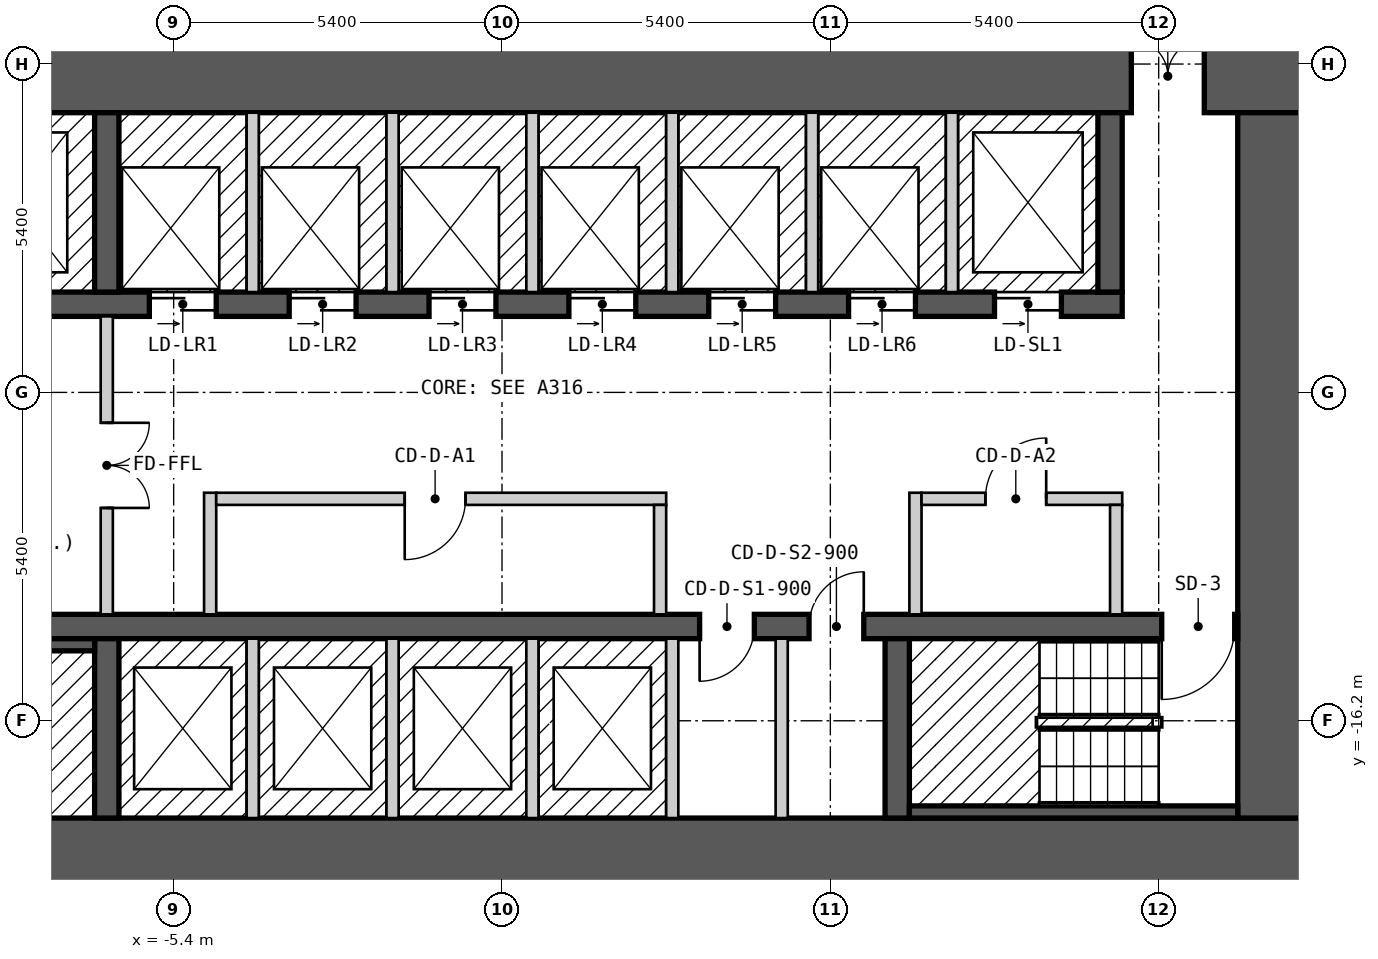
"""IFC4 building model, lengths in metres.
Left out: names, types, materials, properties, quantities, classifications, styles, units other than length and angle.
Written with IfcOpenShell. Run it as: python <this file> out.ifc"""

import sys

from ifc_helpers import new_model, si_unit, direction, frame, frame_2d, origin, place, context, subcontext, project, spatial, rectangle, extrude, element, fill, save


model = new_model("IFC4")
c1 = context("Model", 3, precision=1e-05, world=origin(), true_north=direction((0.0, 1.0)))
c2 = subcontext(c1, "Body", "Model", "MODEL_VIEW")
j1 = project(units=[si_unit("LENGTHUNIT", "METRE"), si_unit("PLANEANGLEUNIT", "RADIAN")], contexts=[c1])
p1 = place(None, origin())
s1 = spatial("IfcSite", under=j1, at=p1, CompositionType="ELEMENT")
p2 = place(p1, origin())
s2 = spatial("IfcBuilding", under=s1, at=p2, CompositionType="ELEMENT")
p3 = place(p2, frame((0.0, 0.0, 47.4)))
s3 = spatial("IfcBuildingStorey", under=s2, at=p3, CompositionType="ELEMENT", Elevation=47.4)
p4 = place(p3, frame((-13.3, -18.4, 0.0), z_axis=(0.0, 0.0, 1.0), x_axis=(1.0, 0.0, 0.0)))
e1 = element("IfcWall", 1, at=p4, inside=s3, PredefinedType="SHEAR", context=c2, shape_type="SweptSolid", body=[
    extrude(rectangle(XDim=26.6, YDim=1.2, at=frame_2d((13.3, 0.0))), origin(), (0.0, 0.0, 1.0), 2.7),
])
p5 = place(p3, frame((-13.3, -5.6, 0.0), z_axis=(0.0, 0.0, 1.0), x_axis=(1.0, 0.0, 0.0)))
e2 = element("IfcWall", 2, at=p5, inside=s3, PredefinedType="SHEAR", context=c2, shape_type="SweptSolid", body=[
    extrude(rectangle(XDim=26.6, YDim=1.2, at=frame_2d((13.3, 0.0))), origin(), (0.0, 0.0, 1.0), 2.7),
])
p6 = place(p5, frame((23.65, 0.0, 0.0)))
e3 = element("IfcOpeningElement", 3, at=p6, cuts=e2, PredefinedType="OPENING", context=c2, shape_type="SweptSolid", body=[
    extrude(rectangle(XDim=1.2, YDim=2.1, at=frame_2d((0.6, 1.05))), frame((0.0, 0.61, 0.0), z_axis=(0.0, -1.0, 0.0), x_axis=(1.0, 0.0, 0.0)), (0.0, 0.0, 1.0), 1.22),
])
p7 = place(p3, frame((12.7, -17.8, 0.0), z_axis=(0.0, 0.0, 1.0), x_axis=(0.0, 1.0, 0.0)))
e4 = element("IfcWall", 4, at=p7, inside=s3, PredefinedType="SHEAR", context=c2, shape_type="SweptSolid", body=[
    extrude(rectangle(XDim=11.6, YDim=1.2, at=frame_2d((5.8, 0.0))), origin(), (0.0, 0.0, 1.0), 2.7),
])
p8 = place(p3, frame((-12.1, -14.65, 0.0), z_axis=(0.0, 0.0, 1.0), x_axis=(1.0, 0.0, 0.0)))
e5 = element("IfcWall", 5, at=p8, inside=s3, PredefinedType="SHEAR", context=c2, shape_type="SweptSolid", body=[
    extrude(rectangle(XDim=24.2, YDim=0.4, at=frame_2d((12.1, 0.0))), origin(), (0.0, 0.0, 1.0), 2.7),
])
p9 = place(p8, frame((1.3, 0.0, 0.0), z_axis=(0.0, 0.0, 1.0), x_axis=(-1.0, 0.0, 0.0)))
e6 = element("IfcOpeningElement", 6, at=p9, cuts=e5, PredefinedType="OPENING", context=c2, shape_type="SweptSolid", body=[
    extrude(rectangle(XDim=1.2, YDim=2.1, at=frame_2d((0.6, 1.05))), frame((0.0, 0.21, 0.0), z_axis=(0.0, -1.0, 0.0), x_axis=(1.0, 0.0, 0.0)), (0.0, 0.0, 1.0), 0.42),
])
p10 = place(p8, frame((24.15, 0.0, 0.0), z_axis=(0.0, 0.0, 1.0), x_axis=(-1.0, 0.0, 0.0)))
e7 = element("IfcOpeningElement", 7, at=p10, cuts=e5, PredefinedType="OPENING", context=c2, shape_type="SweptSolid", body=[
    extrude(rectangle(XDim=1.2, YDim=2.1, at=frame_2d((0.6, 1.05))), frame((0.0, 0.21, 0.0), z_axis=(0.0, -1.0, 0.0), x_axis=(1.0, 0.0, 0.0)), (0.0, 0.0, 1.0), 0.42),
])
p11 = place(p8, frame((16.25, 0.0, 0.0), z_axis=(0.0, 0.0, 1.0), x_axis=(-1.0, 0.0, 0.0)))
e8 = element("IfcOpeningElement", 8, at=p11, cuts=e5, PredefinedType="OPENING", context=c2, shape_type="SweptSolid", body=[
    extrude(rectangle(XDim=0.9, YDim=2.1, at=frame_2d((0.45, 1.05))), frame((0.0, 0.21, 0.0), z_axis=(0.0, -1.0, 0.0), x_axis=(1.0, 0.0, 0.0)), (0.0, 0.0, 1.0), 0.42),
])
p12 = place(p8, frame((18.05, 0.0, 0.0), z_axis=(0.0, 0.0, 1.0), x_axis=(-1.0, 0.0, 0.0)))
e9 = element("IfcOpeningElement", 9, at=p12, cuts=e5, PredefinedType="OPENING", context=c2, shape_type="SweptSolid", body=[
    extrude(rectangle(XDim=0.9, YDim=2.1, at=frame_2d((0.45, 1.05))), frame((0.0, 0.21, 0.0), z_axis=(0.0, -1.0, 0.0), x_axis=(1.0, 0.0, 0.0)), (0.0, 0.0, 1.0), 0.42),
])
p13 = place(p3, frame((-12.1, -9.35, 0.0), z_axis=(0.0, 0.0, 1.0), x_axis=(1.0, 0.0, 0.0)))
e10 = element("IfcWall", 10, at=p13, inside=s3, PredefinedType="SHEAR", context=c2, shape_type="SweptSolid", body=[
    extrude(rectangle(XDim=22.3, YDim=0.4, at=frame_2d((11.15, 0.0))), origin(), (0.0, 0.0, 1.0), 2.7),
])
p14 = place(p13, frame((0.7, 0.0, 0.0)))
e11 = element("IfcOpeningElement", 11, at=p14, cuts=e10, PredefinedType="OPENING", context=c2, shape_type="SweptSolid", body=[
    extrude(rectangle(XDim=1.1, YDim=2.1, at=frame_2d((0.55, 1.05))), frame((0.0, 0.21, 0.0), z_axis=(0.0, -1.0, 0.0), x_axis=(1.0, 0.0, 0.0)), (0.0, 0.0, 1.0), 0.42),
])
p15 = place(p13, frame((3.5, 0.0, 0.0)))
e12 = element("IfcOpeningElement", 12, at=p15, cuts=e10, PredefinedType="OPENING", context=c2, shape_type="SweptSolid", body=[
    extrude(rectangle(XDim=1.1, YDim=2.1, at=frame_2d((0.55, 1.05))), frame((0.0, 0.21, 0.0), z_axis=(0.0, -1.0, 0.0), x_axis=(1.0, 0.0, 0.0)), (0.0, 0.0, 1.0), 0.42),
])
p16 = place(p13, frame((6.3, 0.0, 0.0)))
e13 = element("IfcOpeningElement", 13, at=p16, cuts=e10, PredefinedType="OPENING", context=c2, shape_type="SweptSolid", body=[
    extrude(rectangle(XDim=1.1, YDim=2.1, at=frame_2d((0.55, 1.05))), frame((0.0, 0.21, 0.0), z_axis=(0.0, -1.0, 0.0), x_axis=(1.0, 0.0, 0.0)), (0.0, 0.0, 1.0), 0.42),
])
p17 = place(p13, frame((8.6, 0.0, 0.0)))
e14 = element("IfcOpeningElement", 14, at=p17, cuts=e10, PredefinedType="OPENING", context=c2, shape_type="SweptSolid", body=[
    extrude(rectangle(XDim=1.1, YDim=2.1, at=frame_2d((0.55, 1.05))), frame((0.0, 0.21, 0.0), z_axis=(0.0, -1.0, 0.0), x_axis=(1.0, 0.0, 0.0)), (0.0, 0.0, 1.0), 0.42),
])
p18 = place(p13, frame((10.9, 0.0, 0.0)))
e15 = element("IfcOpeningElement", 15, at=p18, cuts=e10, PredefinedType="OPENING", context=c2, shape_type="SweptSolid", body=[
    extrude(rectangle(XDim=1.1, YDim=2.1, at=frame_2d((0.55, 1.05))), frame((0.0, 0.21, 0.0), z_axis=(0.0, -1.0, 0.0), x_axis=(1.0, 0.0, 0.0)), (0.0, 0.0, 1.0), 0.42),
])
p19 = place(p13, frame((13.2, 0.0, 0.0)))
e16 = element("IfcOpeningElement", 16, at=p19, cuts=e10, PredefinedType="OPENING", context=c2, shape_type="SweptSolid", body=[
    extrude(rectangle(XDim=1.1, YDim=2.1, at=frame_2d((0.55, 1.05))), frame((0.0, 0.21, 0.0), z_axis=(0.0, -1.0, 0.0), x_axis=(1.0, 0.0, 0.0)), (0.0, 0.0, 1.0), 0.42),
])
p20 = place(p13, frame((15.5, 0.0, 0.0)))
e17 = element("IfcOpeningElement", 17, at=p20, cuts=e10, PredefinedType="OPENING", context=c2, shape_type="SweptSolid", body=[
    extrude(rectangle(XDim=1.1, YDim=2.1, at=frame_2d((0.55, 1.05))), frame((0.0, 0.21, 0.0), z_axis=(0.0, -1.0, 0.0), x_axis=(1.0, 0.0, 0.0)), (0.0, 0.0, 1.0), 0.42),
])
p21 = place(p13, frame((17.8, 0.0, 0.0)))
e18 = element("IfcOpeningElement", 18, at=p21, cuts=e10, PredefinedType="OPENING", context=c2, shape_type="SweptSolid", body=[
    extrude(rectangle(XDim=1.1, YDim=2.1, at=frame_2d((0.55, 1.05))), frame((0.0, 0.21, 0.0), z_axis=(0.0, -1.0, 0.0), x_axis=(1.0, 0.0, 0.0)), (0.0, 0.0, 1.0), 0.42),
])
p22 = place(p13, frame((20.2, 0.0, 0.0)))
e19 = element("IfcOpeningElement", 19, at=p22, cuts=e10, PredefinedType="OPENING", context=c2, shape_type="SweptSolid", body=[
    extrude(rectangle(XDim=1.1, YDim=2.1, at=frame_2d((0.55, 1.05))), frame((0.0, 0.21, 0.0), z_axis=(0.0, -1.0, 0.0), x_axis=(1.0, 0.0, 0.0)), (0.0, 0.0, 1.0), 0.42),
])
for number, where, z_axis, x_axis in (
    (20, (-6.5, -17.8, 0.0), (0.0, 0.0, 1.0), (0.0, 1.0, 0.0)),
    (21, (6.5, -17.8, 0.0), (0.0, 0.0, 1.0), (0.0, 1.0, 0.0)),
    (22, (-6.5, -9.15, 0.0), (0.0, 0.0, 1.0), (0.0, 1.0, 0.0)),
    (23, (10.0, -9.15, 0.0), (0.0, 0.0, 1.0), (0.0, 1.0, 0.0)),
):
    element("IfcWall", number, at=place(p3, frame(where, z_axis=z_axis, x_axis=x_axis)), inside=s3, PredefinedType="SHEAR", context=c2, shape_type="SweptSolid", body=[
        extrude(rectangle(XDim=2.95, YDim=0.4, at=frame_2d((1.475, 0.0))), origin(), (0.0, 0.0, 1.0), 2.7),
    ])
p23 = place(p3, frame((-10.8, -14.95, 0.0), z_axis=(0.0, 0.0, 1.0), x_axis=(1.0, 0.0, 0.0)))
e24 = element("IfcWall", 24, at=p23, inside=s3, PredefinedType="SOLIDWALL", context=c2, shape_type="SweptSolid", body=[
    extrude(rectangle(XDim=4.1, YDim=0.2, at=frame_2d((2.05, 0.0))), origin(), (0.0, 0.0, 1.0), 2.7),
])
p24 = place(p3, frame((-6.5, -14.45, 0.0), z_axis=(0.0, 0.0, 1.0), x_axis=(0.0, 1.0, 0.0)))
e25 = element("IfcWall", 25, at=p24, inside=s3, PredefinedType="PARTITIONING", context=c2, shape_type="SweptSolid", body=[
    extrude(rectangle(XDim=4.9, YDim=0.2, at=frame_2d((2.45, 0.0))), origin(), (0.0, 0.0, 1.0), 2.7),
])
p25 = place(p24, frame((3.15, 0.0, 0.0), z_axis=(0.0, 0.0, 1.0), x_axis=(-1.0, 0.0, 0.0)))
e26 = element("IfcOpeningElement", 26, at=p25, cuts=e25, PredefinedType="OPENING", context=c2, shape_type="SweptSolid", body=[
    extrude(rectangle(XDim=1.4, YDim=2.1, at=frame_2d((0.7, 1.05))), frame((0.0, 0.11, 0.0), z_axis=(0.0, -1.0, 0.0), x_axis=(1.0, 0.0, 0.0)), (0.0, 0.0, 1.0), 0.22),
])
p26 = place(p3, frame((-4.8, -14.45, 0.0), z_axis=(0.0, 0.0, 1.0), x_axis=(0.0, 1.0, 0.0)))
e27 = element("IfcWall", 27, at=p26, inside=s3, PredefinedType="PARTITIONING", context=c2, shape_type="SweptSolid", body=[
    extrude(rectangle(XDim=2.0, YDim=0.2, at=frame_2d((1.0, 0.0))), origin(), (0.0, 0.0, 1.0), 2.7),
])
p27 = place(p3, frame((-4.7, -12.55, 0.0), z_axis=(0.0, 0.0, 1.0), x_axis=(1.0, 0.0, 0.0)))
e28 = element("IfcWall", 28, at=p27, inside=s3, PredefinedType="PARTITIONING", context=c2, shape_type="SweptSolid", body=[
    extrude(rectangle(XDim=7.4, YDim=0.2, at=frame_2d((3.7, 0.0))), origin(), (0.0, 0.0, 1.0), 2.7),
])
p28 = place(p27, frame((4.1, 0.0, 0.0), z_axis=(0.0, 0.0, 1.0), x_axis=(-1.0, 0.0, 0.0)))
e29 = element("IfcOpeningElement", 29, at=p28, cuts=e28, PredefinedType="OPENING", context=c2, shape_type="SweptSolid", body=[
    extrude(rectangle(XDim=1.0, YDim=2.1, at=frame_2d((0.5, 1.05))), frame((0.0, 0.11, 0.0), z_axis=(0.0, -1.0, 0.0), x_axis=(1.0, 0.0, 0.0)), (0.0, 0.0, 1.0), 0.22),
])
for number, where, z_axis, x_axis in (
    (30, (-4.1, -17.8, 0.0), (0.0, 0.0, 1.0), (0.0, 1.0, 0.0)),
    (31, (-4.1, -9.15, 0.0), (0.0, 0.0, 1.0), (0.0, 1.0, 0.0)),
    (32, (-1.8, -17.8, 0.0), (0.0, 0.0, 1.0), (0.0, 1.0, 0.0)),
    (33, (-1.8, -9.15, 0.0), (0.0, 0.0, 1.0), (0.0, 1.0, 0.0)),
    (34, (0.5, -17.8, 0.0), (0.0, 0.0, 1.0), (0.0, 1.0, 0.0)),
    (35, (0.5, -9.15, 0.0), (0.0, 0.0, 1.0), (0.0, 1.0, 0.0)),
):
    element("IfcWall", number, at=place(p3, frame(where, z_axis=z_axis, x_axis=x_axis)), inside=s3, PredefinedType="SOLIDWALL", context=c2, shape_type="SweptSolid", body=[
        extrude(rectangle(XDim=2.95, YDim=0.2, at=frame_2d((1.475, 0.0))), origin(), (0.0, 0.0, 1.0), 2.7),
    ])
p29 = place(p3, frame((2.6, -14.45, 0.0), z_axis=(0.0, 0.0, 1.0), x_axis=(0.0, 1.0, 0.0)))
e36 = element("IfcWall", 36, at=p29, inside=s3, PredefinedType="PARTITIONING", context=c2, shape_type="SweptSolid", body=[
    extrude(rectangle(XDim=1.8, YDim=0.2, at=frame_2d((0.9, 0.0))), origin(), (0.0, 0.0, 1.0), 2.7),
])
for number, where, z_axis, x_axis in (
    (37, (2.8, -17.8, 0.0), (0.0, 0.0, 1.0), (0.0, 1.0, 0.0)),
    (38, (2.8, -9.15, 0.0), (0.0, 0.0, 1.0), (0.0, 1.0, 0.0)),
):
    element("IfcWall", number, at=place(p3, frame(where, z_axis=z_axis, x_axis=x_axis)), inside=s3, PredefinedType="SOLIDWALL", context=c2, shape_type="SweptSolid", body=[
        extrude(rectangle(XDim=2.95, YDim=0.2, at=frame_2d((1.475, 0.0))), origin(), (0.0, 0.0, 1.0), 2.7),
    ])
p30 = place(p3, frame((4.6, -17.8, 0.0), z_axis=(0.0, 0.0, 1.0), x_axis=(0.0, 1.0, 0.0)))
e39 = element("IfcWall", 39, at=p30, inside=s3, PredefinedType="PARTITIONING", context=c2, shape_type="SweptSolid", body=[
    extrude(rectangle(XDim=2.95, YDim=0.2, at=frame_2d((1.475, 0.0))), origin(), (0.0, 0.0, 1.0), 2.7),
])
p31 = place(p3, frame((5.1, -9.15, 0.0), z_axis=(0.0, 0.0, 1.0), x_axis=(0.0, 1.0, 0.0)))
e40 = element("IfcWall", 40, at=p31, inside=s3, PredefinedType="SOLIDWALL", context=c2, shape_type="SweptSolid", body=[
    extrude(rectangle(XDim=2.95, YDim=0.2, at=frame_2d((1.475, 0.0))), origin(), (0.0, 0.0, 1.0), 2.7),
])
p32 = place(p3, frame((6.7, -17.7, 0.0), z_axis=(0.0, 0.0, 1.0), x_axis=(1.0, 0.0, 0.0)))
e41 = element("IfcWall", 41, at=p32, inside=s3, PredefinedType="SOLIDWALL", context=c2, shape_type="SweptSolid", body=[
    extrude(rectangle(XDim=5.4, YDim=0.2, at=frame_2d((2.7, 0.0))), origin(), (0.0, 0.0, 1.0), 2.7),
])
p33 = place(p3, frame((6.8, -14.45, 0.0), z_axis=(0.0, 0.0, 1.0), x_axis=(0.0, 1.0, 0.0)))
e42 = element("IfcWall", 42, at=p33, inside=s3, PredefinedType="PARTITIONING", context=c2, shape_type="SweptSolid", body=[
    extrude(rectangle(XDim=2.0, YDim=0.2, at=frame_2d((1.0, 0.0))), origin(), (0.0, 0.0, 1.0), 2.7),
])
p34 = place(p3, frame((6.9, -12.55, 0.0), z_axis=(0.0, 0.0, 1.0), x_axis=(1.0, 0.0, 0.0)))
e43 = element("IfcWall", 43, at=p34, inside=s3, PredefinedType="PARTITIONING", context=c2, shape_type="SweptSolid", body=[
    extrude(rectangle(XDim=3.3, YDim=0.2, at=frame_2d((1.65, 0.0))), origin(), (0.0, 0.0, 1.0), 2.7),
])
p35 = place(p34, frame((2.05, 0.0, 0.0), z_axis=(0.0, 0.0, 1.0), x_axis=(-1.0, 0.0, 0.0)))
e44 = element("IfcOpeningElement", 44, at=p35, cuts=e43, PredefinedType="OPENING", context=c2, shape_type="SweptSolid", body=[
    extrude(rectangle(XDim=1.0, YDim=2.1, at=frame_2d((0.5, 1.05))), frame((0.0, 0.11, 0.0), z_axis=(0.0, -1.0, 0.0), x_axis=(1.0, 0.0, 0.0)), (0.0, 0.0, 1.0), 0.22),
])
p36 = place(p3, frame((7.4, -9.15, 0.0), z_axis=(0.0, 0.0, 1.0), x_axis=(0.0, 1.0, 0.0)))
e45 = element("IfcWall", 45, at=p36, inside=s3, PredefinedType="SOLIDWALL", context=c2, shape_type="SweptSolid", body=[
    extrude(rectangle(XDim=2.95, YDim=0.2, at=frame_2d((1.475, 0.0))), origin(), (0.0, 0.0, 1.0), 2.7),
])
p37 = place(p3, frame((10.1, -14.45, 0.0), z_axis=(0.0, 0.0, 1.0), x_axis=(0.0, 1.0, 0.0)))
e46 = element("IfcWall", 46, at=p37, inside=s3, PredefinedType="PARTITIONING", context=c2, shape_type="SweptSolid", body=[
    extrude(rectangle(XDim=1.8, YDim=0.2, at=frame_2d((0.9, 0.0))), origin(), (0.0, 0.0, 1.0), 2.7),
])
p38 = place(p16, origin())
e47 = element("IfcDoor", 47, at=p38, inside=s3, OperationType="DOUBLE_DOOR_SLIDING", PredefinedType="DOOR", context=c2, shape_type="SweptSolid", body=[
    extrude(rectangle(XDim=1.1, YDim=2.1, at=frame_2d((0.55, 1.05))), frame((0.0, 0.025, 0.0), z_axis=(0.0, -1.0, 0.0), x_axis=(1.0, 0.0, 0.0)), (0.0, 0.0, 1.0), 0.05),
])
fill(e13, e47)
p39 = place(p17, origin())
e48 = element("IfcDoor", 48, at=p39, inside=s3, OperationType="DOUBLE_DOOR_SLIDING", PredefinedType="DOOR", context=c2, shape_type="SweptSolid", body=[
    extrude(rectangle(XDim=1.1, YDim=2.1, at=frame_2d((0.55, 1.05))), frame((0.0, 0.025, 0.0), z_axis=(0.0, -1.0, 0.0), x_axis=(1.0, 0.0, 0.0)), (0.0, 0.0, 1.0), 0.05),
])
fill(e14, e48)
p40 = place(p18, origin())
e49 = element("IfcDoor", 49, at=p40, inside=s3, OperationType="DOUBLE_DOOR_SLIDING", PredefinedType="DOOR", context=c2, shape_type="SweptSolid", body=[
    extrude(rectangle(XDim=1.1, YDim=2.1, at=frame_2d((0.55, 1.05))), frame((0.0, 0.025, 0.0), z_axis=(0.0, -1.0, 0.0), x_axis=(1.0, 0.0, 0.0)), (0.0, 0.0, 1.0), 0.05),
])
fill(e15, e49)
p41 = place(p19, origin())
e50 = element("IfcDoor", 50, at=p41, inside=s3, OperationType="DOUBLE_DOOR_SLIDING", PredefinedType="DOOR", context=c2, shape_type="SweptSolid", body=[
    extrude(rectangle(XDim=1.1, YDim=2.1, at=frame_2d((0.55, 1.05))), frame((0.0, 0.025, 0.0), z_axis=(0.0, -1.0, 0.0), x_axis=(1.0, 0.0, 0.0)), (0.0, 0.0, 1.0), 0.05),
])
fill(e16, e50)
p42 = place(p20, origin())
e51 = element("IfcDoor", 51, at=p42, inside=s3, OperationType="DOUBLE_DOOR_SLIDING", PredefinedType="DOOR", context=c2, shape_type="SweptSolid", body=[
    extrude(rectangle(XDim=1.1, YDim=2.1, at=frame_2d((0.55, 1.05))), frame((0.0, 0.025, 0.0), z_axis=(0.0, -1.0, 0.0), x_axis=(1.0, 0.0, 0.0)), (0.0, 0.0, 1.0), 0.05),
])
fill(e17, e51)
p43 = place(p21, origin())
e52 = element("IfcDoor", 52, at=p43, inside=s3, OperationType="DOUBLE_DOOR_SLIDING", PredefinedType="DOOR", context=c2, shape_type="SweptSolid", body=[
    extrude(rectangle(XDim=1.1, YDim=2.1, at=frame_2d((0.55, 1.05))), frame((0.0, 0.025, 0.0), z_axis=(0.0, -1.0, 0.0), x_axis=(1.0, 0.0, 0.0)), (0.0, 0.0, 1.0), 0.05),
])
fill(e18, e52)
p44 = place(p22, origin())
e53 = element("IfcDoor", 53, at=p44, inside=s3, OperationType="DOUBLE_DOOR_SLIDING", PredefinedType="DOOR", context=c2, shape_type="SweptSolid", body=[
    extrude(rectangle(XDim=1.1, YDim=2.1, at=frame_2d((0.55, 1.05))), frame((0.0, 0.025, 0.0), z_axis=(0.0, -1.0, 0.0), x_axis=(1.0, 0.0, 0.0)), (0.0, 0.0, 1.0), 0.05),
])
fill(e19, e53)
p45 = place(p10, origin())
e54 = element("IfcDoor", 54, at=p45, inside=s3, OperationType="SINGLE_SWING_RIGHT", PredefinedType="DOOR", context=c2, shape_type="SweptSolid", body=[
    extrude(rectangle(XDim=1.2, YDim=2.1, at=frame_2d((0.6, 1.05))), frame((0.0, 0.025, 0.0), z_axis=(0.0, -1.0, 0.0), x_axis=(1.0, 0.0, 0.0)), (0.0, 0.0, 1.0), 0.05),
])
fill(e7, e54)
p46 = place(p25, origin())
e55 = element("IfcDoor", 55, at=p46, inside=s3, OperationType="DOUBLE_DOOR_SINGLE_SWING", PredefinedType="DOOR", context=c2, shape_type="SweptSolid", body=[
    extrude(rectangle(XDim=1.4, YDim=2.1, at=frame_2d((0.7, 1.05))), frame((0.0, 0.025, 0.0), z_axis=(0.0, -1.0, 0.0), x_axis=(1.0, 0.0, 0.0)), (0.0, 0.0, 1.0), 0.05),
])
fill(e26, e55)
p47 = place(p6, origin())
e56 = element("IfcDoor", 56, at=p47, inside=s3, OperationType="DOUBLE_DOOR_SINGLE_SWING", PredefinedType="DOOR", context=c2, shape_type="SweptSolid", body=[
    extrude(rectangle(XDim=1.2, YDim=2.1, at=frame_2d((0.6, 1.05))), frame((0.0, 0.025, 0.0), z_axis=(0.0, -1.0, 0.0), x_axis=(1.0, 0.0, 0.0)), (0.0, 0.0, 1.0), 0.05),
])
fill(e3, e56)
p48 = place(p28, origin())
e57 = element("IfcDoor", 57, at=p48, inside=s3, OperationType="SINGLE_SWING_RIGHT", PredefinedType="DOOR", context=c2, shape_type="SweptSolid", body=[
    extrude(rectangle(XDim=1.0, YDim=2.1, at=frame_2d((0.5, 1.05))), frame((0.0, 0.025, 0.0), z_axis=(0.0, -1.0, 0.0), x_axis=(1.0, 0.0, 0.0)), (0.0, 0.0, 1.0), 0.05),
])
fill(e29, e57)
p49 = place(p35, origin())
e58 = element("IfcDoor", 58, at=p49, inside=s3, OperationType="SINGLE_SWING_LEFT", PredefinedType="DOOR", context=c2, shape_type="SweptSolid", body=[
    extrude(rectangle(XDim=1.0, YDim=2.1, at=frame_2d((0.5, 1.05))), frame((0.0, 0.025, 0.0), z_axis=(0.0, -1.0, 0.0), x_axis=(1.0, 0.0, 0.0)), (0.0, 0.0, 1.0), 0.05),
])
fill(e44, e58)
p50 = place(p11, origin())
e59 = element("IfcDoor", 59, at=p50, inside=s3, OperationType="SINGLE_SWING_RIGHT", PredefinedType="DOOR", context=c2, shape_type="SweptSolid", body=[
    extrude(rectangle(XDim=0.9, YDim=2.1, at=frame_2d((0.45, 1.05))), frame((0.0, 0.025, 0.0), z_axis=(0.0, -1.0, 0.0), x_axis=(1.0, 0.0, 0.0)), (0.0, 0.0, 1.0), 0.05),
])
fill(e8, e59)
p51 = place(p12, origin())
e60 = element("IfcDoor", 60, at=p51, inside=s3, OperationType="SINGLE_SWING_LEFT", PredefinedType="DOOR", context=c2, shape_type="SweptSolid", body=[
    extrude(rectangle(XDim=0.9, YDim=2.1, at=frame_2d((0.45, 1.05))), frame((0.0, 0.025, 0.0), z_axis=(0.0, -1.0, 0.0), x_axis=(1.0, 0.0, 0.0)), (0.0, 0.0, 1.0), 0.05),
])
fill(e9, e60)
save(model, sys.argv[1])
